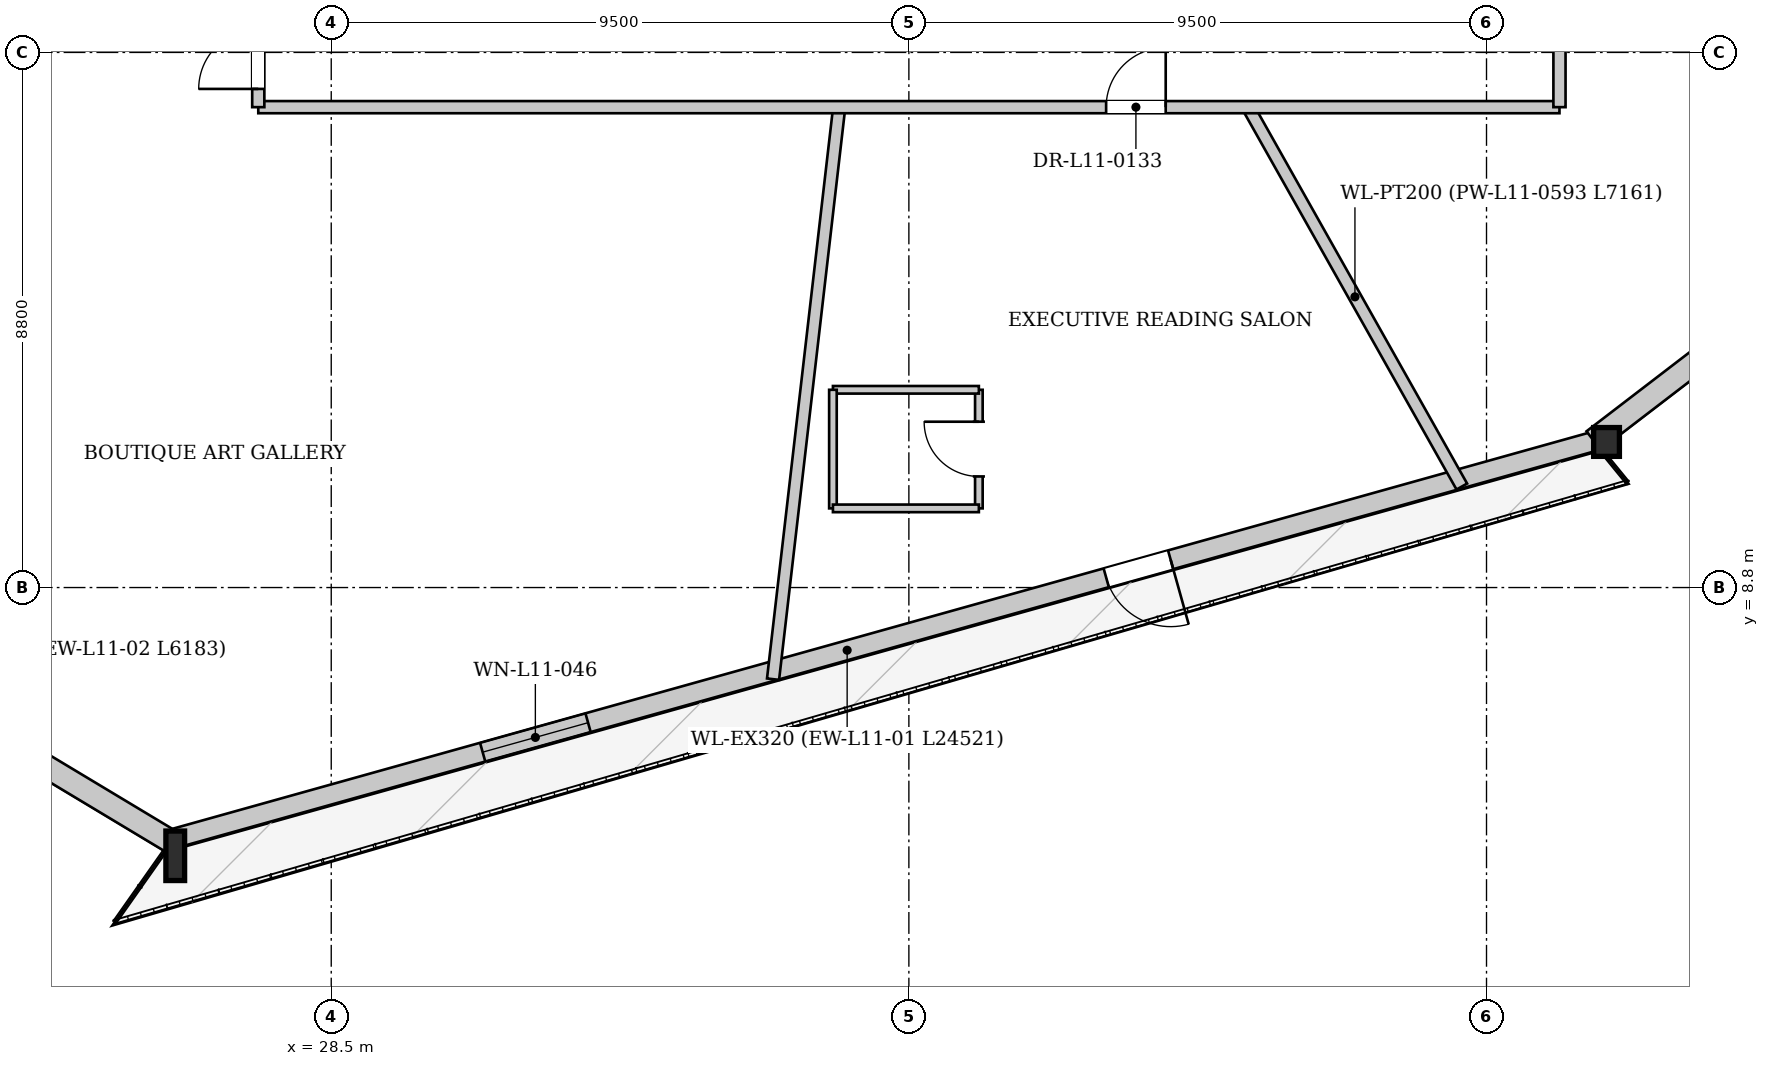
"""IFC4 building model, lengths in metres.
Left out: names, types, materials, properties, quantities, classifications, styles, units other than length and angle.
Written with IfcOpenShell. Run it as: python <this file> out.ifc"""

import sys

from ifc_helpers import new_model, si_unit, direction, frame, frame_2d, origin, origin_2d, place, context, subcontext, project, spatial, rectangle, i_section, extrude, source, transform, mapped, element, fill, save


model = new_model("IFC4")
c1 = context("Model", 3, precision=1e-05, world=origin(), true_north=direction((0.0, 1.0)))
c2 = subcontext(c1, "Body", "Model", "MODEL_VIEW")
j1 = project(units=[si_unit("LENGTHUNIT", "METRE"), si_unit("PLANEANGLEUNIT", "RADIAN")], contexts=[c1])
p1 = place(None, origin())
s1 = spatial("IfcSite", under=j1, at=p1, CompositionType="ELEMENT")
p2 = place(p1, origin())
s2 = spatial("IfcBuilding", under=s1, at=p2, CompositionType="ELEMENT")
p3 = place(p2, frame((0.0, 0.0, 47.05)))
s3 = spatial("IfcBuildingStorey", under=s2, at=p3, CompositionType="ELEMENT", Elevation=47.05)
m1 = source(origin(), c2, "Body", "SweptSolid", [
    extrude(i_section(OverallWidth=0.308, OverallDepth=0.814, WebThickness=0.021, FlangeThickness=0.04, at=origin_2d()), origin(), (0.0, 0.0, 1.0), 3.406),
])
p4 = place(p3, frame((25.76, 4.464, 0.0), z_axis=(0.102280047299, -0.044223398166, 0.993772148422), x_axis=(0.396867213304, 0.91787603466, 0.0)))
e1 = element("IfcColumn", 1, at=p4, inside=s3, PredefinedType="COLUMN", context=c2, shape_type="MappedRepresentation", body=[
    mapped(m1, transform((0.0, 0.0, 0.0), x_axis=(1.0, 0.0, 0.0), y_axis=(0.0, 1.0, 0.0), z_axis=(0.0, 0.0, 1.0), scale=1.0)),
])
m2 = source(origin(), c2, "Body", "SweptSolid", [
    extrude(i_section(OverallWidth=0.424, OverallDepth=0.474, WebThickness=0.043, FlangeThickness=0.068, at=origin_2d()), origin(), (0.0, 0.0, 1.0), 3.4),
])
p5 = place(p3, frame((49.376, 11.068, 0.0), z_axis=(0.057730403011, 0.074317123279, 0.995562236003), x_axis=(-0.789721843632, 0.613465084329, 0.0)))
e2 = element("IfcColumn", 2, at=p5, inside=s3, PredefinedType="COLUMN", context=c2, shape_type="MappedRepresentation", body=[
    mapped(m2, transform((0.0, 0.0, 0.0), x_axis=(1.0, 0.0, 0.0), y_axis=(0.0, 1.0, 0.0), z_axis=(0.0, 0.0, 1.0), scale=1.0)),
])
p6 = place(p3, frame((49.333, 11.222, 0.0), z_axis=(0.0, 0.0, 1.0), x_axis=(-0.96305403072, -0.269308250734, 0.0)))
e3 = element("IfcWall", 3, at=p6, inside=s3, PredefinedType="SOLIDWALL", context=c2, shape_type="SweptSolid", body=[
    extrude(rectangle(XDim=24.521, YDim=0.32, at=frame_2d((12.261, 0.0))), origin(), (0.0, 0.0, 1.0), 2.592),
])
p7 = place(p6, frame((7.297, 0.0, 0.0)))
e4 = element("IfcOpeningElement", 4, at=p7, cuts=e3, PredefinedType="OPENING", context=c2, shape_type="SweptSolid", body=[
    extrude(rectangle(XDim=1.1, YDim=2.3, at=frame_2d((0.55, 1.15))), frame((0.0, 0.17, 0.0), z_axis=(0.0, -1.0, 0.0), x_axis=(1.0, 0.0, 0.0)), (0.0, 0.0, 1.0), 0.34),
])
p8 = place(p6, frame((17.246, 0.0, 0.272)))
e5 = element("IfcOpeningElement", 5, at=p8, cuts=e3, PredefinedType="OPENING", context=c2, shape_type="SweptSolid", body=[
    extrude(rectangle(XDim=1.8, YDim=2.2, at=frame_2d((0.9, 1.1))), frame((0.0, 0.17, 0.0), z_axis=(0.0, -1.0, 0.0), x_axis=(1.0, 0.0, 0.0)), (0.0, 0.0, 1.0), 0.34),
])
p9 = place(p3, frame((25.858, 4.627, 0.0), z_axis=(0.0, 0.0, 1.0), x_axis=(-0.857186181791, 0.515006650196, 0.0)))
e6 = element("IfcWall", 6, at=p9, inside=s3, PredefinedType="SOLIDWALL", context=c2, shape_type="SweptSolid", body=[
    extrude(rectangle(XDim=6.183, YDim=0.38, at=frame_2d((3.092, 0.0))), origin(), (0.0, 0.0, 1.0), 2.592),
])
p10 = place(p3, frame((68.72, 26.138, 0.0), z_axis=(0.0, 0.0, 1.0), x_axis=(-0.793606361292, -0.608431543657, 0.0)))
e7 = element("IfcWall", 7, at=p10, inside=s3, PredefinedType="SOLIDWALL", context=c2, shape_type="SweptSolid", body=[
    extrude(rectangle(XDim=24.521, YDim=0.38, at=frame_2d((12.261, 0.0))), origin(), (0.0, 0.0, 1.0), 2.592),
])
p11 = place(p10, frame((6.516, 0.0, 0.222)))
e8 = element("IfcOpeningElement", 8, at=p11, cuts=e7, PredefinedType="OPENING", context=c2, shape_type="SweptSolid", body=[
    extrude(rectangle(XDim=2.2, YDim=2.25, at=frame_2d((1.1, 1.125))), frame((0.0, 0.2, 0.0), z_axis=(0.0, -1.0, 0.0), x_axis=(1.0, 0.0, 0.0)), (0.0, 0.0, 1.0), 0.4),
])
p12 = place(p10, frame((16.555, 0.0, 0.222)))
e9 = element("IfcOpeningElement", 9, at=p12, cuts=e7, PredefinedType="OPENING", context=c2, shape_type="SweptSolid", body=[
    extrude(rectangle(XDim=2.2, YDim=2.25, at=frame_2d((1.1, 1.125))), frame((0.0, 0.2, 0.0), z_axis=(0.0, -1.0, 0.0), x_axis=(1.0, 0.0, 0.0)), (0.0, 0.0, 1.0), 0.4),
])
p13 = place(p3, frame((43.578, 16.7, 0.0), z_axis=(0.0, 0.0, 1.0), x_axis=(0.490916627621, -0.871206556865, 0.0)))
e10 = element("IfcWall", 10, at=p13, inside=s3, PredefinedType="PARTITIONING", context=c2, shape_type="SweptSolid", body=[
    extrude(rectangle(XDim=7.161, YDim=0.2, at=frame_2d((3.581, 0.0))), origin(), (0.0, 0.0, 1.0), 3.3),
])
p14 = place(p3, frame((27.3, 21.519, 0.0), z_axis=(0.0, 0.0, 1.0), x_axis=(-0.90333786909, -0.428929707839, 0.0)))
e11 = element("IfcWall", 11, at=p14, inside=s3, PredefinedType="PARTITIONING", context=c2, shape_type="SweptSolid", body=[
    extrude(rectangle(XDim=10.5, YDim=0.2, at=frame_2d((5.25, 0.0))), origin(), (0.0, 0.0, 1.0), 3.3),
])
p15 = place(p3, frame((36.854, 16.7, 0.0), z_axis=(0.0, 0.0, 1.0), x_axis=(-0.11493529064, -0.993372980791, 0.0)))
e12 = element("IfcWall", 12, at=p15, inside=s3, PredefinedType="PARTITIONING", context=c2, shape_type="SweptSolid", body=[
    extrude(rectangle(XDim=9.469, YDim=0.2, at=frame_2d((4.735, 0.0))), origin(), (0.0, 0.0, 1.0), 3.3),
])
p16 = place(p3, frame((39.151, 10.102, 0.0), z_axis=(0.0, 0.0, 1.0), x_axis=(0.0, 1.0, 0.0)))
e13 = element("IfcWall", 13, at=p16, inside=s3, PredefinedType="PARTITIONING", context=c2, shape_type="SweptSolid", body=[
    extrude(rectangle(XDim=1.95, YDim=0.125, at=frame_2d((0.975, 0.0))), origin(), (0.0, 0.0, 1.0), 3.3),
])
p17 = place(p16, frame((0.525, 0.0, 0.0)))
e14 = element("IfcOpeningElement", 14, at=p17, cuts=e13, PredefinedType="OPENING", context=c2, shape_type="SweptSolid", body=[
    extrude(rectangle(XDim=0.9, YDim=2.1, at=frame_2d((0.45, 1.05))), frame((0.0, 0.073, 0.0), z_axis=(0.0, -1.0, 0.0), x_axis=(1.0, 0.0, 0.0)), (0.0, 0.0, 1.0), 0.145),
])
p18 = place(p3, frame((39.151, 12.052, 0.0), z_axis=(0.0, 0.0, 1.0), x_axis=(-1.0, 0.0, 0.0)))
e15 = element("IfcWall", 15, at=p18, inside=s3, PredefinedType="PARTITIONING", context=c2, shape_type="SweptSolid", body=[
    extrude(rectangle(XDim=2.4, YDim=0.125, at=frame_2d((1.2, 0.0))), origin(), (0.0, 0.0, 1.0), 2.985),
])
p19 = place(p3, frame((36.751, 12.052, 0.0), z_axis=(0.0, 0.0, 1.0), x_axis=(0.0, -1.0, 0.0)))
e16 = element("IfcWall", 16, at=p19, inside=s3, PredefinedType="PARTITIONING", context=c2, shape_type="SweptSolid", body=[
    extrude(rectangle(XDim=1.95, YDim=0.125, at=frame_2d((0.975, 0.0))), origin(), (0.0, 0.0, 1.0), 3.3),
])
p20 = place(p3, frame((36.751, 10.102, 0.0), z_axis=(0.0, 0.0, 1.0), x_axis=(1.0, 0.0, 0.0)))
e17 = element("IfcWall", 17, at=p20, inside=s3, PredefinedType="PARTITIONING", context=c2, shape_type="SweptSolid", body=[
    extrude(rectangle(XDim=2.4, YDim=0.125, at=frame_2d((1.2, 0.0))), origin(), (0.0, 0.0, 1.0), 3.3),
])
p21 = place(p3, frame((27.3, 16.7, 0.0), z_axis=(0.0, 0.0, 1.0), x_axis=(1.0, 0.0, 0.0)))
e18 = element("IfcWall", 18, at=p21, inside=s3, PredefinedType="PARTITIONING", context=c2, shape_type="SweptSolid", body=[
    extrude(rectangle(XDim=21.4, YDim=0.2, at=frame_2d((10.7, 0.0))), origin(), (0.0, 0.0, 1.0), 3.3),
])
p22 = place(p21, frame((13.944, 0.0, 0.0)))
e19 = element("IfcOpeningElement", 19, at=p22, cuts=e18, PredefinedType="OPENING", context=c2, shape_type="SweptSolid", body=[
    extrude(rectangle(XDim=0.98, YDim=2.15, at=frame_2d((0.49, 1.075))), frame((0.0, 0.11, 0.0), z_axis=(0.0, -1.0, 0.0), x_axis=(1.0, 0.0, 0.0)), (0.0, 0.0, 1.0), 0.22),
])
p23 = place(p3, frame((27.3, 16.7, 0.0), z_axis=(0.0, 0.0, 1.0), x_axis=(0.0, 1.0, 0.0)))
e20 = element("IfcWall", 20, at=p23, inside=s3, PredefinedType="PARTITIONING", context=c2, shape_type="SweptSolid", body=[
    extrude(rectangle(XDim=19.8, YDim=0.2, at=frame_2d((9.9, 0.0))), origin(), (0.0, 0.0, 1.0), 3.3),
])
p24 = place(p23, frame((18.52, 0.0, 0.0)))
e21 = element("IfcOpeningElement", 21, at=p24, cuts=e20, PredefinedType="OPENING", context=c2, shape_type="SweptSolid", body=[
    extrude(rectangle(XDim=0.98, YDim=2.15, at=frame_2d((0.49, 1.075))), frame((0.0, 0.11, 0.0), z_axis=(0.0, -1.0, 0.0), x_axis=(1.0, 0.0, 0.0)), (0.0, 0.0, 1.0), 0.22),
])
p25 = place(p23, frame((12.318, 0.0, 0.0)))
e22 = element("IfcOpeningElement", 22, at=p25, cuts=e20, PredefinedType="OPENING", context=c2, shape_type="SweptSolid", body=[
    extrude(rectangle(XDim=0.98, YDim=2.15, at=frame_2d((0.49, 1.075))), frame((0.0, 0.11, 0.0), z_axis=(0.0, -1.0, 0.0), x_axis=(1.0, 0.0, 0.0)), (0.0, 0.0, 1.0), 0.22),
])
p26 = place(p23, frame((0.3, 0.0, 0.0)))
e23 = element("IfcOpeningElement", 23, at=p26, cuts=e20, PredefinedType="OPENING", context=c2, shape_type="SweptSolid", body=[
    extrude(rectangle(XDim=0.98, YDim=2.15, at=frame_2d((0.49, 1.075))), frame((0.0, 0.11, 0.0), z_axis=(0.0, -1.0, 0.0), x_axis=(1.0, 0.0, 0.0)), (0.0, 0.0, 1.0), 0.22),
])
p27 = place(p3, frame((48.7, 16.7, 0.0), z_axis=(0.0, 0.0, 1.0), x_axis=(0.0, 1.0, 0.0)))
e24 = element("IfcWall", 24, at=p27, inside=s3, PredefinedType="PARTITIONING", context=c2, shape_type="SweptSolid", body=[
    extrude(rectangle(XDim=19.8, YDim=0.2, at=frame_2d((9.9, 0.0))), origin(), (0.0, 0.0, 1.0), 3.3),
])
p28 = place(p27, frame((1.545, 0.0, 0.0)))
e25 = element("IfcOpeningElement", 25, at=p28, cuts=e24, PredefinedType="OPENING", context=c2, shape_type="SweptSolid", body=[
    extrude(rectangle(XDim=0.98, YDim=2.15, at=frame_2d((0.49, 1.075))), frame((0.0, 0.11, 0.0), z_axis=(0.0, -1.0, 0.0), x_axis=(1.0, 0.0, 0.0)), (0.0, 0.0, 1.0), 0.22),
])
p29 = place(p27, frame((16.237, 0.0, 0.0)))
e26 = element("IfcOpeningElement", 26, at=p29, cuts=e24, PredefinedType="OPENING", context=c2, shape_type="SweptSolid", body=[
    extrude(rectangle(XDim=0.98, YDim=2.15, at=frame_2d((0.49, 1.075))), frame((0.0, 0.11, 0.0), z_axis=(0.0, -1.0, 0.0), x_axis=(1.0, 0.0, 0.0)), (0.0, 0.0, 1.0), 0.22),
])
m3 = source(origin(), c2, "Body", "SweptSolid", [
    extrude(rectangle(XDim=1.1, YDim=2.3, at=frame_2d((0.55, 1.15))), frame((0.0, 0.025, 0.0), z_axis=(0.0, -1.0, 0.0), x_axis=(1.0, 0.0, 0.0)), (0.0, 0.0, 1.0), 0.05),
])
p30 = place(p7, origin())
e27 = element("IfcDoor", 27, at=p30, inside=s3, OperationType="SINGLE_SWING_LEFT", PredefinedType="DOOR", context=c2, shape_type="MappedRepresentation", body=[
    mapped(m3, transform((0.0, 0.0, 0.0), x_axis=(1.0, 0.0, 0.0), y_axis=(0.0, 1.0, 0.0), z_axis=(0.0, 0.0, 1.0), scale=1.0)),
])
fill(e4, e27)
m4 = source(origin(), c2, "Body", "SweptSolid", [
    extrude(rectangle(XDim=1.8, YDim=2.2, at=frame_2d((0.9, 1.1))), frame((0.0, 0.03, 0.0), z_axis=(0.0, -1.0, 0.0), x_axis=(1.0, 0.0, 0.0)), (0.0, 0.0, 1.0), 0.06),
])
p31 = place(p8, origin())
e28 = element("IfcWindow", 28, at=p31, inside=s3, PartitioningType="SINGLE_PANEL", PredefinedType="WINDOW", context=c2, shape_type="MappedRepresentation", body=[
    mapped(m4, transform((0.0, 0.0, 0.0), x_axis=(1.0, 0.0, 0.0), y_axis=(0.0, 1.0, 0.0), z_axis=(0.0, 0.0, 1.0), scale=1.0)),
])
fill(e5, e28)
m5 = source(origin(), c2, "Body", "SweptSolid", [
    extrude(rectangle(XDim=0.9, YDim=2.1, at=frame_2d((0.45, 1.05))), frame((0.0, 0.025, 0.0), z_axis=(0.0, -1.0, 0.0), x_axis=(1.0, 0.0, 0.0)), (0.0, 0.0, 1.0), 0.05),
])
p32 = place(p17, origin())
e29 = element("IfcDoor", 29, at=p32, inside=s3, OperationType="SINGLE_SWING_RIGHT", PredefinedType="DOOR", context=c2, shape_type="MappedRepresentation", body=[
    mapped(m5, transform((0.0, 0.0, 0.0), x_axis=(1.0, 0.0, 0.0), y_axis=(0.0, 1.0, 0.0), z_axis=(0.0, 0.0, 1.0), scale=1.0)),
])
fill(e14, e29)
m6 = source(origin(), c2, "Body", "SweptSolid", [
    extrude(rectangle(XDim=0.98, YDim=2.15, at=frame_2d((0.49, 1.075))), frame((0.0, 0.025, 0.0), z_axis=(0.0, -1.0, 0.0), x_axis=(1.0, 0.0, 0.0)), (0.0, 0.0, 1.0), 0.05),
])
p33 = place(p22, origin())
e30 = element("IfcDoor", 30, at=p33, inside=s3, OperationType="SINGLE_SWING_RIGHT", PredefinedType="DOOR", context=c2, shape_type="MappedRepresentation", body=[
    mapped(m6, transform((0.0, 0.0, 0.0), x_axis=(1.0, 0.0, 0.0), y_axis=(0.0, 1.0, 0.0), z_axis=(0.0, 0.0, 1.0), scale=1.0)),
])
fill(e19, e30)
p34 = place(p26, origin())
e31 = element("IfcDoor", 31, at=p34, inside=s3, OperationType="SINGLE_SWING_LEFT", PredefinedType="DOOR", context=c2, shape_type="MappedRepresentation", body=[
    mapped(m6, transform((0.0, 0.0, 0.0), x_axis=(1.0, 0.0, 0.0), y_axis=(0.0, 1.0, 0.0), z_axis=(0.0, 0.0, 1.0), scale=1.0)),
])
fill(e23, e31)
save(model, sys.argv[1])
